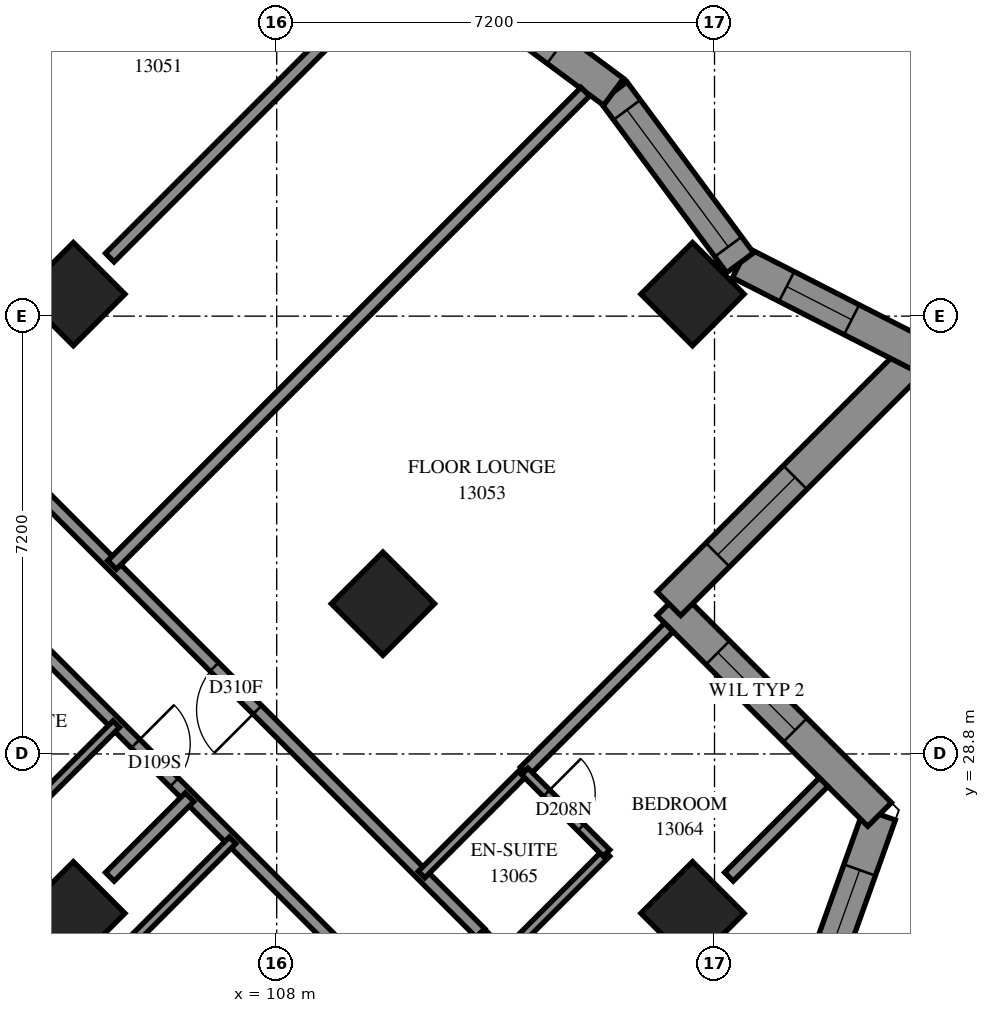
"""IFC4 building model, lengths in metres.
Left out: names, types, materials, properties, quantities, classifications, styles, units other than length and angle.
Written with IfcOpenShell. Run it as: python <this file> out.ifc"""

import sys

from ifc_helpers import new_model, si_unit, direction, frame, frame_2d, origin, origin_2d, place, context, subcontext, project, spatial, polyline, rectangle, outline, extrude, element, fill, save


model = new_model("IFC4")
c1 = context("Model", 3, precision=1e-05, world=origin(), true_north=direction((0.0, 1.0)))
c2 = subcontext(c1, "Body", "Model", "MODEL_VIEW")
j1 = project(units=[si_unit("LENGTHUNIT", "METRE"), si_unit("PLANEANGLEUNIT", "RADIAN")], contexts=[c1])
p1 = place(None, origin())
s1 = spatial("IfcSite", under=j1, at=p1, CompositionType="ELEMENT")
p2 = place(p1, origin())
s2 = spatial("IfcBuilding", under=s1, at=p2, CompositionType="ELEMENT")
p3 = place(p2, frame((0.0, 0.0, 50.8)))
s3 = spatial("IfcBuildingStorey", under=s2, at=p3, CompositionType="ELEMENT", Elevation=50.8)
for number, where, z_axis, x_axis in (
    (1, (104.656, 36.362, 0.0), (0.0, 0.0, 1.0), (0.707, -0.707, 0.0)),
    (2, (114.838, 36.362, 0.0), (0.0, 0.0, 1.0), (0.707, -0.707, 0.0)),
    (3, (109.747, 31.271, 0.0), (0.0, 0.0, 1.0), (0.707, -0.707, 0.0)),
    (4, (104.656, 26.18, 0.0), (0.0, 0.0, 1.0), (0.707, -0.707, 0.0)),
    (5, (114.838, 26.18, 0.0), (0.0, 0.0, 1.0), (0.707, -0.707, 0.0)),
):
    element("IfcColumn", number, at=place(p3, frame(where, z_axis=z_axis, x_axis=x_axis)), inside=s3, PredefinedType="COLUMN", context=c2, shape_type="SweptSolid", body=[
        extrude(rectangle(XDim=1.2, YDim=1.2, at=origin_2d()), origin(), (0.0, 0.0, 1.0), 3.1),
    ])
p4 = place(p3, frame((116.122, 22.799, 0.0), z_axis=(0.0, 0.0, 1.0), x_axis=(0.3371641743, 0.9414458665, 0.0)))
e6 = element("IfcWall", 6, at=p4, inside=s3, PredefinedType="SOLIDWALL", context=c2, shape_type="SweptSolid", body=[
    extrude(outline(polyline([(-0.124, -0.275), (5.492, -0.275), (5.144, 0.275), (0.124, 0.275), (-0.124, -0.275)])), origin(), (0.0, 0.0, 1.0), 3.1),
])
p5 = place(p4, frame((0.838, 0.0, 0.5)))
e7 = element("IfcOpeningElement", 7, at=p5, cuts=e6, PredefinedType="OPENING", context=c2, shape_type="SweptSolid", body=[
    extrude(rectangle(XDim=1.2, YDim=2.45, at=frame_2d((0.6, 1.225))), frame((0.0, 0.285, 0.0), z_axis=(0.0, -1.0, 0.0), x_axis=(1.0, 0.0, 0.0)), (0.0, 0.0, 1.0), 0.57),
])
p6 = place(p4, frame((3.147, 0.0, 0.5)))
e8 = element("IfcOpeningElement", 8, at=p6, cuts=e6, PredefinedType="OPENING", context=c2, shape_type="SweptSolid", body=[
    extrude(rectangle(XDim=1.2, YDim=2.45, at=frame_2d((0.6, 1.225))), frame((0.0, 0.285, 0.0), z_axis=(0.0, -1.0, 0.0), x_axis=(1.0, 0.0, 0.0)), (0.0, 0.0, 1.0), 0.57),
])
p7 = place(p3, frame((117.915, 27.805, 0.0), z_axis=(0.0, 0.0, 1.0), x_axis=(-0.7071067812, 0.7071067812, 0.0)))
e9 = element("IfcWall", 9, at=p7, inside=s3, PredefinedType="SOLIDWALL", context=c2, shape_type="SweptSolid", body=[
    extrude(outline(polyline([(-0.174, -0.275), (4.626, -0.275), (5.176, 0.275), (0.174, 0.275), (-0.174, -0.275)])), origin(), (0.0, 0.0, 1.0), 3.1),
])
p8 = place(p7, frame((1.963, 0.0, 0.6)))
e10 = element("IfcOpeningElement", 10, at=p8, cuts=e9, PredefinedType="OPENING", context=c2, shape_type="SweptSolid", body=[
    extrude(rectangle(XDim=1.8, YDim=1.9, at=frame_2d((0.9, 0.95))), frame((0.0, 0.285, 0.0), z_axis=(0.0, -1.0, 0.0), x_axis=(1.0, 0.0, 0.0)), (0.0, 0.0, 1.0), 0.57),
])
p9 = place(p3, frame((114.449, 31.271, 0.0), z_axis=(0.0, 0.0, 1.0), x_axis=(0.7070981737, 0.7071153885, 0.0)))
e11 = element("IfcWall", 11, at=p9, inside=s3, PredefinedType="SOLIDWALL", context=c2, shape_type="SweptSolid", body=[
    extrude(outline(polyline([(0.275, -0.275), (6.187, -0.275), (5.431, 0.275), (-0.275, 0.275), (0.275, -0.275)])), origin(), (0.0, 0.0, 1.0), 3.1),
])
p10 = place(p9, frame((1.137, 0.0, 0.6)))
e12 = element("IfcOpeningElement", 12, at=p10, cuts=e11, PredefinedType="OPENING", context=c2, shape_type="SweptSolid", body=[
    extrude(rectangle(XDim=1.8, YDim=1.9, at=frame_2d((0.9, 0.95))), frame((0.0, 0.285, 0.0), z_axis=(0.0, -1.0, 0.0), x_axis=(1.0, 0.0, 0.0)), (0.0, 0.0, 1.0), 0.57),
])
p11 = place(p3, frame((118.557, 35.378, 0.0), z_axis=(0.0, 0.0, 1.0), x_axis=(-0.8905171602, 0.4549496538, 0.0)))
e13 = element("IfcWall", 13, at=p11, inside=s3, PredefinedType="SOLIDWALL", context=c2, shape_type="SweptSolid", body=[
    extrude(outline(polyline([(-0.378, -0.275), (3.232, -0.275), (3.361, 0.275), (0.378, 0.275), (-0.378, -0.275)])), origin(), (0.0, 0.0, 1.0), 3.1),
])
p12 = place(p11, frame((1.238, 0.0, 0.5)))
e14 = element("IfcOpeningElement", 14, at=p12, cuts=e13, PredefinedType="OPENING", context=c2, shape_type="SweptSolid", body=[
    extrude(rectangle(XDim=1.2, YDim=2.45, at=frame_2d((0.6, 1.225))), frame((0.0, 0.285, 0.0), z_axis=(0.0, -1.0, 0.0), x_axis=(1.0, 0.0, 0.0)), (0.0, 0.0, 1.0), 0.57),
])
p13 = place(p3, frame((115.621, 36.878, 0.0), z_axis=(0.0, 0.0, 1.0), x_axis=(-0.5951290514, 0.8036301464, 0.0)))
e15 = element("IfcWall", 15, at=p13, inside=s3, PredefinedType="SOLIDWALL", context=c2, shape_type="SweptSolid", body=[
    extrude(outline(polyline([(0.065, -0.275), (3.537, -0.275), (3.455, 0.275), (-0.065, 0.275), (0.065, -0.275)])), origin(), (0.0, 0.0, 1.0), 3.1),
])
p14 = place(p13, frame((0.328, 0.0, 0.5)))
e16 = element("IfcOpeningElement", 16, at=p14, cuts=e15, PredefinedType="OPENING", context=c2, shape_type="SweptSolid", body=[
    extrude(rectangle(XDim=2.8, YDim=2.45, at=frame_2d((1.4, 1.225))), frame((0.0, 0.285, 0.0), z_axis=(0.0, -1.0, 0.0), x_axis=(1.0, 0.0, 0.0)), (0.0, 0.0, 1.0), 0.57),
])
p15 = place(p3, frame((113.54, 39.688, 0.0), z_axis=(0.0, 0.0, 1.0), x_axis=(-0.8036342136, 0.5951235593, 0.0)))
e17 = element("IfcWall", 17, at=p15, inside=s3, PredefinedType="SOLIDWALL", context=c2, shape_type="SweptSolid", body=[
    extrude(outline(polyline([(-0.041, -0.275), (3.432, -0.275), (3.514, 0.275), (0.041, 0.275), (-0.041, -0.275)])), origin(), (0.0, 0.0, 1.0), 3.1),
])
p16 = place(p15, frame((1.157, 0.0, 0.5)))
e18 = element("IfcOpeningElement", 18, at=p16, cuts=e17, PredefinedType="OPENING", context=c2, shape_type="SweptSolid", body=[
    extrude(rectangle(XDim=1.2, YDim=2.45, at=frame_2d((0.6, 1.225))), frame((0.0, 0.285, 0.0), z_axis=(0.0, -1.0, 0.0), x_axis=(1.0, 0.0, 0.0)), (0.0, 0.0, 1.0), 0.57),
])
p17 = place(p3, frame((93.481, 41.167, 0.0), z_axis=(0.0, 0.0, 1.0), x_axis=(0.7071067812, -0.7071067812, 0.0)))
e19 = element("IfcWall", 19, at=p17, inside=s3, PredefinedType="PARTITIONING", context=c2, shape_type="SweptSolid", body=[
    extrude(rectangle(XDim=25.699, YDim=0.2, at=frame_2d((12.85, 0.0))), origin(), (0.0, 0.0, 1.0), 3.1),
])
p18 = place(p17, frame((2.8, 0.0, 0.0)))
e20 = element("IfcOpeningElement", 20, at=p18, cuts=e19, PredefinedType="OPENING", context=c2, shape_type="SweptSolid", body=[
    extrude(rectangle(XDim=0.9, YDim=2.1, at=frame_2d((0.45, 1.05))), frame((0.0, 0.11, 0.0), z_axis=(0.0, -1.0, 0.0), x_axis=(1.0, 0.0, 0.0)), (0.0, 0.0, 1.0), 0.22),
])
p19 = place(p17, frame((9.948, 0.0, 0.0)))
e21 = element("IfcOpeningElement", 21, at=p19, cuts=e19, PredefinedType="OPENING", context=c2, shape_type="SweptSolid", body=[
    extrude(rectangle(XDim=0.9, YDim=2.1, at=frame_2d((0.45, 1.05))), frame((0.0, 0.11, 0.0), z_axis=(0.0, -1.0, 0.0), x_axis=(1.0, 0.0, 0.0)), (0.0, 0.0, 1.0), 0.22),
])
p20 = place(p17, frame((11.7, 0.0, 0.0)))
e22 = element("IfcOpeningElement", 22, at=p20, cuts=e19, PredefinedType="OPENING", context=c2, shape_type="SweptSolid", body=[
    extrude(rectangle(XDim=0.9, YDim=2.1, at=frame_2d((0.45, 1.05))), frame((0.0, 0.11, 0.0), z_axis=(0.0, -1.0, 0.0), x_axis=(1.0, 0.0, 0.0)), (0.0, 0.0, 1.0), 0.22),
])
p21 = place(p17, frame((17.25, 0.0, 0.0)))
e23 = element("IfcOpeningElement", 23, at=p21, cuts=e19, PredefinedType="OPENING", context=c2, shape_type="SweptSolid", body=[
    extrude(rectangle(XDim=0.9, YDim=2.1, at=frame_2d((0.45, 1.05))), frame((0.0, 0.11, 0.0), z_axis=(0.0, -1.0, 0.0), x_axis=(1.0, 0.0, 0.0)), (0.0, 0.0, 1.0), 0.22),
])
p22 = place(p17, frame((22.82, 0.0, 0.0)))
e24 = element("IfcOpeningElement", 24, at=p22, cuts=e19, PredefinedType="OPENING", context=c2, shape_type="SweptSolid", body=[
    extrude(rectangle(XDim=0.9, YDim=2.1, at=frame_2d((0.45, 1.05))), frame((0.0, 0.11, 0.0), z_axis=(0.0, -1.0, 0.0), x_axis=(1.0, 0.0, 0.0)), (0.0, 0.0, 1.0), 0.22),
])
p23 = place(p3, frame((111.352, 25.855, 0.0), z_axis=(0.0, 0.0, 1.0), x_axis=(-0.7070418597, 0.7071716967, 0.0)))
e25 = element("IfcWall", 25, at=p23, inside=s3, PredefinedType="PARTITIONING", context=c2, shape_type="SweptSolid", body=[
    extrude(rectangle(XDim=13.864, YDim=0.2, at=frame_2d((6.932, 0.0))), origin(), (0.0, 0.0, 1.0), 3.1),
])
p24 = place(p23, frame((12.564, 0.0, 0.0)))
e26 = element("IfcOpeningElement", 26, at=p24, cuts=e25, PredefinedType="OPENING", context=c2, shape_type="SweptSolid", body=[
    extrude(rectangle(XDim=0.9, YDim=2.1, at=frame_2d((0.45, 1.05))), frame((0.0, 0.11, 0.0), z_axis=(0.0, -1.0, 0.0), x_axis=(1.0, 0.0, 0.0)), (0.0, 0.0, 1.0), 0.22),
])
p25 = place(p23, frame((5.19, 0.0, 0.0)))
e27 = element("IfcOpeningElement", 27, at=p25, cuts=e25, PredefinedType="OPENING", context=c2, shape_type="SweptSolid", body=[
    extrude(rectangle(XDim=1.0, YDim=2.1, at=frame_2d((0.5, 1.05))), frame((0.0, 0.11, 0.0), z_axis=(0.0, -1.0, 0.0), x_axis=(1.0, 0.0, 0.0)), (0.0, 0.0, 1.0), 0.22),
])
p26 = place(p3, frame((105.292, 31.908, 0.0), z_axis=(0.0, 0.0, 1.0), x_axis=(0.7071022382, 0.7071113241, 0.0)))
e28 = element("IfcWall", 28, at=p26, inside=s3, PredefinedType="PARTITIONING", context=c2, shape_type="SweptSolid", body=[
    extrude(rectangle(XDim=11.006, YDim=0.2, at=frame_2d((5.503, 0.0))), origin(), (0.0, 0.0, 1.0), 3.1),
])
p27 = place(p3, frame((101.896, 38.698, 0.0), z_axis=(0.0, 0.0, 1.0), x_axis=(0.7072294804, 0.7069840607, 0.0)))
e29 = element("IfcWall", 29, at=p27, inside=s3, PredefinedType="PARTITIONING", context=c2, shape_type="SweptSolid", body=[
    extrude(rectangle(XDim=8.557, YDim=0.2, at=frame_2d((4.278, 0.0))), origin(), (0.0, 0.0, 1.0), 3.1),
])
p28 = place(p3, frame((105.255, 36.963, 0.0), z_axis=(0.0, 0.0, 1.0), x_axis=(0.7071067812, 0.7071067812, 0.0)))
e30 = element("IfcWall", 30, at=p28, inside=s3, PredefinedType="PARTITIONING", context=c2, shape_type="SweptSolid", body=[
    extrude(rectangle(XDim=5.504, YDim=0.2, at=frame_2d((2.752, 0.0))), origin(), (0.0, 0.0, 1.0), 3.1),
])
p29 = place(p3, frame((112.079, 28.513, 0.0), z_axis=(0.0, 0.0, 1.0), x_axis=(0.7071067812, 0.7071067812, 0.0)))
e31 = element("IfcWall", 31, at=p29, inside=s3, PredefinedType="PARTITIONING", context=c2, shape_type="SweptSolid", body=[
    extrude(rectangle(XDim=3.351, YDim=0.2, at=frame_2d((1.675, 0.0))), origin(), (0.0, 0.0, 1.0), 3.1),
])
p30 = place(p3, frame((111.725, 25.473, 0.0), z_axis=(0.0, 0.0, 1.0), x_axis=(0.7071067812, 0.7071067812, 0.0)))
e32 = element("IfcWall", 32, at=p30, inside=s3, PredefinedType="PARTITIONING", context=c2, shape_type="SweptSolid", body=[
    extrude(rectangle(XDim=2.401, YDim=0.15, at=frame_2d((1.201, 0.0))), origin(), (0.0, 0.0, 1.0), 3.1),
])
p31 = place(p3, frame((105.578, 25.682, 0.0), z_axis=(0.0, 0.0, 1.0), x_axis=(0.706689978, 0.7075233388, 0.0)))
e33 = element("IfcWall", 33, at=p31, inside=s3, PredefinedType="PARTITIONING", context=c2, shape_type="SweptSolid", body=[
    extrude(rectangle(XDim=2.4, YDim=0.15, at=frame_2d((1.2, 0.0))), origin(), (0.0, 0.0, 1.0), 3.1),
])
for number, where, z_axis, x_axis in (
    (34, (110.383, 26.817, 0.0), (0.0, 0.0, 1.0), (0.707, 0.707, 0.0)),
    (35, (103.665, 27.595, 0.0), (0.0, 0.0, 1.0), (0.707, 0.707, 0.0)),
):
    element("IfcWall", number, at=place(p3, frame(where, z_axis=z_axis, x_axis=x_axis)), inside=s3, PredefinedType="PARTITIONING", context=c2, shape_type="SweptSolid", body=[
        extrude(rectangle(XDim=2.398, YDim=0.15, at=frame_2d((1.199, 0.0))), origin(), (0.0, 0.0, 1.0), 3.1),
    ])
p32 = place(p3, frame((112.925, 24.267, 0.0), z_axis=(0.0, 0.0, 1.0), x_axis=(-0.7068383786, 0.707375082, 0.0)))
e36 = element("IfcWall", 36, at=p32, inside=s3, PredefinedType="PARTITIONING", context=c2, shape_type="SweptSolid", body=[
    extrude(rectangle(XDim=2.236, YDim=0.2, at=frame_2d((1.118, 0.0))), origin(), (0.0, 0.0, 1.0), 3.1),
])
p33 = place(p32, frame((0.4, 0.0, 0.0)))
e37 = element("IfcOpeningElement", 37, at=p33, cuts=e36, PredefinedType="OPENING", context=c2, shape_type="SweptSolid", body=[
    extrude(rectangle(XDim=0.9, YDim=2.1, at=frame_2d((0.45, 1.05))), frame((0.0, 0.11, 0.0), z_axis=(0.0, -1.0, 0.0), x_axis=(1.0, 0.0, 0.0)), (0.0, 0.0, 1.0), 0.22),
])
p34 = place(p3, frame((115.438, 26.78, 0.0), z_axis=(0.0, 0.0, 1.0), x_axis=(0.7071067812, 0.7071067812, 0.0)))
e38 = element("IfcWall", 38, at=p34, inside=s3, PredefinedType="PARTITIONING", context=c2, shape_type="SweptSolid", body=[
    extrude(rectangle(XDim=2.201, YDim=0.2, at=frame_2d((1.101, 0.0))), origin(), (0.0, 0.0, 1.0), 3.1),
])
p35 = place(p3, frame((112.08, 28.512, 0.0), z_axis=(0.0, 0.0, 1.0), x_axis=(0.7076330979, -0.7065800724, 0.0)))
e39 = element("IfcWall", 39, at=p35, inside=s3, PredefinedType="PARTITIONING", context=c2, shape_type="SweptSolid", body=[
    extrude(rectangle(XDim=1.899, YDim=0.15, at=frame_2d((0.95, 0.0))), origin(), (0.0, 0.0, 1.0), 3.1),
])
p36 = place(p35, frame((0.505, 0.0, 0.0)))
e40 = element("IfcOpeningElement", 40, at=p36, cuts=e39, PredefinedType="OPENING", context=c2, shape_type="SweptSolid", body=[
    extrude(rectangle(XDim=0.8, YDim=2.1, at=frame_2d((0.4, 1.05))), frame((0.0, 0.085, 0.0), z_axis=(0.0, -1.0, 0.0), x_axis=(1.0, 0.0, 0.0)), (0.0, 0.0, 1.0), 0.17),
])
p37 = place(p3, frame((105.256, 26.78, 0.0), z_axis=(0.0, 0.0, 1.0), x_axis=(0.7076467632, 0.7065663865, 0.0)))
e41 = element("IfcWall", 41, at=p37, inside=s3, PredefinedType="PARTITIONING", context=c2, shape_type="SweptSolid", body=[
    extrude(rectangle(XDim=1.851, YDim=0.2, at=frame_2d((0.926, 0.0))), origin(), (0.0, 0.0, 1.0), 3.1),
])
p38 = place(p6, origin())
e42 = element("IfcWindow", 42, at=p38, inside=s3, PartitioningType="SINGLE_PANEL", PredefinedType="WINDOW", context=c2, shape_type="SweptSolid", body=[
    extrude(rectangle(XDim=1.2, YDim=2.45, at=frame_2d((0.6, 1.225))), frame((0.0, 0.155, 0.0), z_axis=(0.0, -1.0, 0.0), x_axis=(1.0, 0.0, 0.0)), (0.0, 0.0, 1.0), 0.06),
])
fill(e8, e42)
p39 = place(p8, origin())
e43 = element("IfcWindow", 43, at=p39, inside=s3, PartitioningType="SINGLE_PANEL", PredefinedType="WINDOW", context=c2, shape_type="SweptSolid", body=[
    extrude(rectangle(XDim=1.8, YDim=1.9, at=frame_2d((0.9, 0.95))), frame((0.0, 0.155, 0.0), z_axis=(0.0, -1.0, 0.0), x_axis=(1.0, 0.0, 0.0)), (0.0, 0.0, 1.0), 0.06),
])
fill(e10, e43)
p40 = place(p10, origin())
e44 = element("IfcWindow", 44, at=p40, inside=s3, PartitioningType="SINGLE_PANEL", PredefinedType="WINDOW", context=c2, shape_type="SweptSolid", body=[
    extrude(rectangle(XDim=1.8, YDim=1.9, at=frame_2d((0.9, 0.95))), frame((0.0, 0.155, 0.0), z_axis=(0.0, -1.0, 0.0), x_axis=(1.0, 0.0, 0.0)), (0.0, 0.0, 1.0), 0.06),
])
fill(e12, e44)
p41 = place(p12, origin())
e45 = element("IfcWindow", 45, at=p41, inside=s3, PartitioningType="SINGLE_PANEL", PredefinedType="WINDOW", context=c2, shape_type="SweptSolid", body=[
    extrude(rectangle(XDim=1.2, YDim=2.45, at=frame_2d((0.6, 1.225))), frame((0.0, 0.155, 0.0), z_axis=(0.0, -1.0, 0.0), x_axis=(1.0, 0.0, 0.0)), (0.0, 0.0, 1.0), 0.06),
])
fill(e14, e45)
p42 = place(p14, origin())
e46 = element("IfcWindow", 46, at=p42, inside=s3, PartitioningType="SINGLE_PANEL", PredefinedType="WINDOW", context=c2, shape_type="SweptSolid", body=[
    extrude(rectangle(XDim=2.8, YDim=2.45, at=frame_2d((1.4, 1.225))), frame((0.0, 0.155, 0.0), z_axis=(0.0, -1.0, 0.0), x_axis=(1.0, 0.0, 0.0)), (0.0, 0.0, 1.0), 0.06),
])
fill(e16, e46)
p43 = place(p16, origin())
e47 = element("IfcWindow", 47, at=p43, inside=s3, PartitioningType="SINGLE_PANEL", PredefinedType="WINDOW", context=c2, shape_type="SweptSolid", body=[
    extrude(rectangle(XDim=1.2, YDim=2.45, at=frame_2d((0.6, 1.225))), frame((0.0, 0.155, 0.0), z_axis=(0.0, -1.0, 0.0), x_axis=(1.0, 0.0, 0.0)), (0.0, 0.0, 1.0), 0.06),
])
fill(e18, e47)
p44 = place(p25, origin())
e48 = element("IfcDoor", 48, at=p44, inside=s3, OperationType="SINGLE_SWING_RIGHT", PredefinedType="DOOR", context=c2, shape_type="SweptSolid", body=[
    extrude(rectangle(XDim=1.0, YDim=2.1, at=frame_2d((0.5, 1.05))), frame((0.0, 0.025, 0.0), z_axis=(0.0, -1.0, 0.0), x_axis=(1.0, 0.0, 0.0)), (0.0, 0.0, 1.0), 0.05),
])
fill(e27, e48)
p45 = place(p21, origin())
e49 = element("IfcDoor", 49, at=p45, inside=s3, OperationType="SINGLE_SWING_LEFT", PredefinedType="DOOR", context=c2, shape_type="SweptSolid", body=[
    extrude(rectangle(XDim=0.9, YDim=2.1, at=frame_2d((0.45, 1.05))), frame((0.0, 0.025, 0.0), z_axis=(0.0, -1.0, 0.0), x_axis=(1.0, 0.0, 0.0)), (0.0, 0.0, 1.0), 0.05),
])
fill(e23, e49)
p46 = place(p36, origin())
e50 = element("IfcDoor", 50, at=p46, inside=s3, OperationType="SINGLE_SWING_RIGHT", PredefinedType="DOOR", context=c2, shape_type="SweptSolid", body=[
    extrude(rectangle(XDim=0.8, YDim=2.1, at=frame_2d((0.4, 1.05))), frame((0.0, 0.025, 0.0), z_axis=(0.0, -1.0, 0.0), x_axis=(1.0, 0.0, 0.0)), (0.0, 0.0, 1.0), 0.05),
])
fill(e40, e50)
save(model, sys.argv[1])
